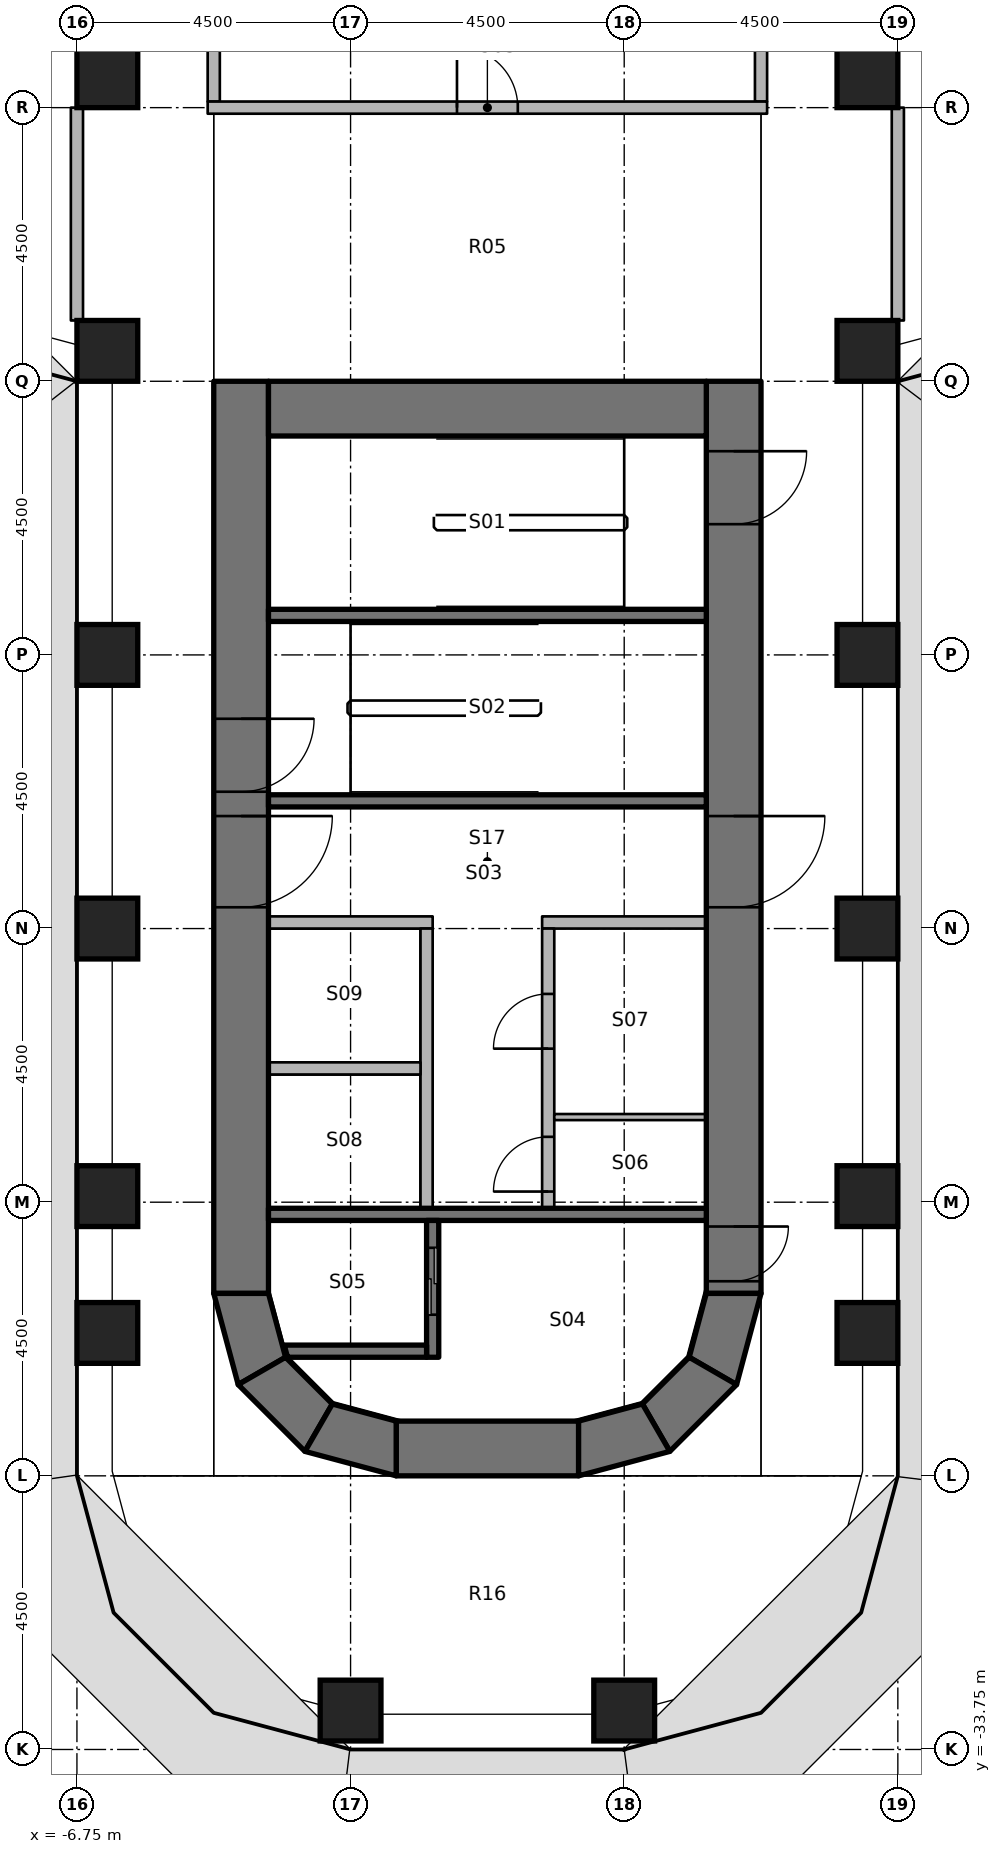
"""IFC4 building model, lengths in metres.
Left out: names, types, materials, properties, quantities, classifications, styles, units other than length and angle.
Written with IfcOpenShell. Run it as: python <this file> out.ifc"""

import sys

from ifc_helpers import new_model, si_unit, direction, frame, frame_2d, origin, origin_2d, place, context, subcontext, project, spatial, polyline, rectangle, outline, extrude, element, fill, save


model = new_model("IFC4")
c1 = context("Model", 3, precision=1e-05, world=origin(), true_north=direction((0.0, 1.0)))
c2 = subcontext(c1, "Body", "Model", "MODEL_VIEW")
j1 = project(units=[si_unit("LENGTHUNIT", "METRE"), si_unit("PLANEANGLEUNIT", "RADIAN")], contexts=[c1])
p1 = place(None, origin())
s1 = spatial("IfcSite", under=j1, at=p1, CompositionType="ELEMENT")
p2 = place(p1, origin())
s2 = spatial("IfcBuilding", under=s1, at=p2, CompositionType="ELEMENT")
p3 = place(p2, frame((0.0, 0.0, 69.0)))
s3 = spatial("IfcBuildingStorey", under=s2, at=p3, CompositionType="ELEMENT", Elevation=69.0)
for number, where, z_axis, x_axis in (
    (1, (-6.25, -26.9, 0.0), (0.0, 0.0, 1.0), (1.0, 0.0, 0.0)),
    (2, (-6.25, -24.65, 0.0), (0.0, 0.0, 1.0), (1.0, 0.0, 0.0)),
    (3, (-6.25, -20.25, 0.0), (0.0, 0.0, 1.0), (1.0, 0.0, 0.0)),
    (4, (-6.25, -15.75, 0.0), (0.0, 0.0, 1.0), (1.0, 0.0, 0.0)),
    (5, (-6.25, -10.75, 0.0), (0.0, 0.0, 1.0), (1.0, 0.0, 0.0)),
    (6, (-6.25, -6.25, 0.0), (0.0, 0.0, 1.0), (1.0, 0.0, 0.0)),
    (7, (-2.25, -33.11, 0.0), (0.0, 0.0, 1.0), (1.0, 0.0, 0.0)),
    (8, (2.25, -33.11, 0.0), (0.0, 0.0, 1.0), (1.0, 0.0, 0.0)),
    (9, (6.25, -26.9, 0.0), (0.0, 0.0, 1.0), (1.0, 0.0, 0.0)),
    (10, (6.25, -24.65, 0.0), (0.0, 0.0, 1.0), (1.0, 0.0, 0.0)),
    (11, (6.25, -20.25, 0.0), (0.0, 0.0, 1.0), (1.0, 0.0, 0.0)),
    (12, (6.25, -15.75, 0.0), (0.0, 0.0, 1.0), (1.0, 0.0, 0.0)),
    (13, (6.25, -10.75, 0.0), (0.0, 0.0, 1.0), (1.0, 0.0, 0.0)),
    (14, (6.25, -6.25, 0.0), (0.0, 0.0, 1.0), (1.0, 0.0, 0.0)),
):
    element("IfcColumn", number, at=place(p3, frame(where, z_axis=z_axis, x_axis=x_axis)), inside=s3, PredefinedType="COLUMN", context=c2, shape_type="SweptSolid", body=[
        extrude(rectangle(XDim=1.0, YDim=1.0, at=origin_2d()), origin(), (0.0, 0.0, 1.0), 4.05),
    ])
p4 = place(p3, frame((-4.05, -11.25, 0.0), z_axis=(0.0, 0.0, 1.0), x_axis=(0.0, -1.0, 0.0)))
e15 = element("IfcWall", 15, at=p4, inside=s3, PredefinedType="SHEAR", context=c2, shape_type="SweptSolid", body=[
    extrude(rectangle(XDim=15.0, YDim=0.9, at=frame_2d((7.5, 0.0))), origin(), (0.0, 0.0, 1.0), 4.2),
])
p5 = place(p4, frame((7.15, 0.0, 0.0)))
e16 = element("IfcOpeningElement", 16, at=p5, cuts=e15, PredefinedType="OPENING", context=c2, shape_type="SweptSolid", body=[
    extrude(rectangle(XDim=1.5, YDim=2.3, at=frame_2d((0.75, 1.15))), frame((0.0, 0.46, 0.0), z_axis=(0.0, -1.0, 0.0), x_axis=(1.0, 0.0, 0.0)), (0.0, 0.0, 1.0), 0.92),
])
p6 = place(p4, frame((5.55, 0.0, 0.0)))
e17 = element("IfcOpeningElement", 17, at=p6, cuts=e15, PredefinedType="OPENING", context=c2, shape_type="SweptSolid", body=[
    extrude(rectangle(XDim=1.2, YDim=2.1, at=frame_2d((0.6, 1.05))), frame((0.0, 0.46, 0.0), z_axis=(0.0, -1.0, 0.0), x_axis=(1.0, 0.0, 0.0)), (0.0, 0.0, 1.0), 0.92),
])
p7 = place(p3, frame((4.05, -11.25, 0.0), z_axis=(0.0, 0.0, 1.0), x_axis=(0.0, -1.0, 0.0)))
e18 = element("IfcWall", 18, at=p7, inside=s3, PredefinedType="SHEAR", context=c2, shape_type="SweptSolid", body=[
    extrude(rectangle(XDim=15.0, YDim=0.9, at=frame_2d((7.5, 0.0))), origin(), (0.0, 0.0, 1.0), 4.2),
])
p8 = place(p7, frame((7.15, 0.0, 0.0)))
e19 = element("IfcOpeningElement", 19, at=p8, cuts=e18, PredefinedType="OPENING", context=c2, shape_type="SweptSolid", body=[
    extrude(rectangle(XDim=1.5, YDim=2.3, at=frame_2d((0.75, 1.15))), frame((0.0, 0.46, 0.0), z_axis=(0.0, -1.0, 0.0), x_axis=(1.0, 0.0, 0.0)), (0.0, 0.0, 1.0), 0.92),
])
p9 = place(p7, frame((13.9, 0.0, 0.0)))
e20 = element("IfcOpeningElement", 20, at=p9, cuts=e18, PredefinedType="OPENING", context=c2, shape_type="SweptSolid", body=[
    extrude(rectangle(XDim=0.9, YDim=2.1, at=frame_2d((0.45, 1.05))), frame((0.0, 0.46, 0.0), z_axis=(0.0, -1.0, 0.0), x_axis=(1.0, 0.0, 0.0)), (0.0, 0.0, 1.0), 0.92),
])
p10 = place(p7, frame((1.15, 0.0, 0.0)))
e21 = element("IfcOpeningElement", 21, at=p10, cuts=e18, PredefinedType="OPENING", context=c2, shape_type="SweptSolid", body=[
    extrude(rectangle(XDim=1.2, YDim=2.1, at=frame_2d((0.6, 1.05))), frame((0.0, 0.46, 0.0), z_axis=(0.0, -1.0, 0.0), x_axis=(1.0, 0.0, 0.0)), (0.0, 0.0, 1.0), 0.92),
])
p11 = place(p3, frame((-3.6, -11.7, 0.0), z_axis=(0.0, 0.0, 1.0), x_axis=(1.0, 0.0, 0.0)))
e22 = element("IfcWall", 22, at=p11, inside=s3, PredefinedType="SHEAR", context=c2, shape_type="SweptSolid", body=[
    extrude(rectangle(XDim=7.2, YDim=0.9, at=frame_2d((3.6, 0.0))), origin(), (0.0, 0.0, 1.0), 4.2),
])
p12 = place(p3, frame((-1.5, -28.8, 0.0), z_axis=(0.0, 0.0, 1.0), x_axis=(1.0, 0.0, 0.0)))
e23 = element("IfcWall", 23, at=p12, inside=s3, PredefinedType="SHEAR", context=c2, shape_type="SweptSolid", body=[
    extrude(rectangle(XDim=3.0, YDim=0.9, at=frame_2d((1.5, 0.0))), origin(), (0.0, 0.0, 1.0), 4.2),
])
p13 = place(p3, origin())
e24 = element("IfcWall", 24, at=p13, inside=s3, PredefinedType="SHEAR", context=c2, shape_type="SweptSolid", body=[
    extrude(outline(polyline([(-4.5, -26.25), (-4.098, -27.75), (-3.319, -27.3), (-3.6, -26.25), (-4.5, -26.25)])), origin(), (0.0, 0.0, 1.0), 4.2),
])
p14 = place(p3, origin())
e25 = element("IfcWall", 25, at=p14, inside=s3, PredefinedType="SHEAR", context=c2, shape_type="SweptSolid", body=[
    extrude(outline(polyline([(-4.098, -27.75), (-3.0, -28.848), (-2.55, -28.069), (-3.319, -27.3), (-4.098, -27.75)])), origin(), (0.0, 0.0, 1.0), 4.2),
])
p15 = place(p3, origin())
e26 = element("IfcWall", 26, at=p15, inside=s3, PredefinedType="SHEAR", context=c2, shape_type="SweptSolid", body=[
    extrude(outline(polyline([(-3.0, -28.848), (-1.5, -29.25), (-1.5, -28.35), (-2.55, -28.069), (-3.0, -28.848)])), origin(), (0.0, 0.0, 1.0), 4.2),
])
p16 = place(p3, origin())
e27 = element("IfcWall", 27, at=p16, inside=s3, PredefinedType="SHEAR", context=c2, shape_type="SweptSolid", body=[
    extrude(outline(polyline([(4.5, -26.25), (4.098, -27.75), (3.319, -27.3), (3.6, -26.25), (4.5, -26.25)])), origin(), (0.0, 0.0, 1.0), 4.2),
])
p17 = place(p3, origin())
e28 = element("IfcWall", 28, at=p17, inside=s3, PredefinedType="SHEAR", context=c2, shape_type="SweptSolid", body=[
    extrude(outline(polyline([(4.098, -27.75), (3.0, -28.848), (2.55, -28.069), (3.319, -27.3), (4.098, -27.75)])), origin(), (0.0, 0.0, 1.0), 4.2),
])
p18 = place(p3, origin())
e29 = element("IfcWall", 29, at=p18, inside=s3, PredefinedType="SHEAR", context=c2, shape_type="SweptSolid", body=[
    extrude(outline(polyline([(3.0, -28.848), (1.5, -29.25), (1.5, -28.35), (2.55, -28.069), (3.0, -28.848)])), origin(), (0.0, 0.0, 1.0), 4.2),
])
p19 = place(p3, frame((3.6, -24.95, 0.0), z_axis=(0.0, 0.0, 1.0), x_axis=(-1.0, 0.0, 0.0)))
e30 = element("IfcWall", 30, at=p19, inside=s3, PredefinedType="SHEAR", context=c2, shape_type="SweptSolid", body=[
    extrude(rectangle(XDim=7.2, YDim=0.2, at=frame_2d((3.6, 0.0))), origin(), (0.0, 0.0, 1.0), 4.05),
])
p20 = place(p3, frame((-0.9, -27.3, 0.0), z_axis=(0.0, 0.0, 1.0), x_axis=(0.0, 1.0, 0.0)))
e31 = element("IfcWall", 31, at=p20, inside=s3, PredefinedType="SHEAR", context=c2, shape_type="SweptSolid", body=[
    extrude(rectangle(XDim=2.25, YDim=0.2, at=frame_2d((1.125, 0.0))), origin(), (0.0, 0.0, 1.0), 4.05),
])
p21 = place(p20, frame((0.7, 0.0, 0.0)))
e32 = element("IfcOpeningElement", 32, at=p21, cuts=e31, PredefinedType="OPENING", context=c2, shape_type="SweptSolid", body=[
    extrude(rectangle(XDim=1.1, YDim=2.3, at=frame_2d((0.55, 1.15))), frame((0.0, 0.11, 0.0), z_axis=(0.0, -1.0, 0.0), x_axis=(1.0, 0.0, 0.0)), (0.0, 0.0, 1.0), 0.22),
])
p22 = place(p3, origin())
e33 = element("IfcWall", 33, at=p22, inside=s3, PredefinedType="SHEAR", context=c2, shape_type="SweptSolid", body=[
    extrude(outline(polyline([(-1.0, -27.1), (-3.341, -27.1), (-3.291, -27.284), (-3.275, -27.3), (-1.0, -27.3), (-1.0, -27.1)])), origin(), (0.0, 0.0, 1.0), 4.05),
])
for number, where, z_axis, x_axis in (
    (34, (3.6, -18.15, 0.0), (0.0, 0.0, 1.0), (-1.0, 0.0, 0.0)),
    (35, (3.6, -15.1, 0.0), (0.0, 0.0, 1.0), (-1.0, 0.0, 0.0)),
):
    element("IfcWall", number, at=place(p3, frame(where, z_axis=z_axis, x_axis=x_axis)), inside=s3, PredefinedType="SHEAR", context=c2, shape_type="SweptSolid", body=[
        extrude(rectangle(XDim=7.2, YDim=0.2, at=frame_2d((3.6, 0.0))), origin(), (0.0, 0.0, 1.0), 4.05),
    ])
p23 = place(p3, frame((3.6, -20.15, 0.0), z_axis=(0.0, 0.0, 1.0), x_axis=(-1.0, 0.0, 0.0)))
e36 = element("IfcWall", 36, at=p23, inside=s3, PredefinedType="PARTITIONING", context=c2, shape_type="SweptSolid", body=[
    extrude(rectangle(XDim=2.7, YDim=0.2, at=frame_2d((1.35, 0.0))), origin(), (0.0, 0.0, 1.0), 4.05),
])
p24 = place(p3, frame((1.0, -24.85, 0.0), z_axis=(0.0, 0.0, 1.0), x_axis=(0.0, 1.0, 0.0)))
e37 = element("IfcWall", 37, at=p24, inside=s3, PredefinedType="PARTITIONING", context=c2, shape_type="SweptSolid", body=[
    extrude(rectangle(XDim=4.6, YDim=0.2, at=frame_2d((2.3, 0.0))), origin(), (0.0, 0.0, 1.0), 4.05),
])
p25 = place(p24, frame((0.275, 0.0, 0.0)))
e38 = element("IfcOpeningElement", 38, at=p25, cuts=e37, PredefinedType="OPENING", context=c2, shape_type="SweptSolid", body=[
    extrude(rectangle(XDim=0.9, YDim=2.1, at=frame_2d((0.45, 1.05))), frame((0.0, 0.11, 0.0), z_axis=(0.0, -1.0, 0.0), x_axis=(1.0, 0.0, 0.0)), (0.0, 0.0, 1.0), 0.22),
])
p26 = place(p24, frame((2.625, 0.0, 0.0)))
e39 = element("IfcOpeningElement", 39, at=p26, cuts=e37, PredefinedType="OPENING", context=c2, shape_type="SweptSolid", body=[
    extrude(rectangle(XDim=0.9, YDim=2.1, at=frame_2d((0.45, 1.05))), frame((0.0, 0.11, 0.0), z_axis=(0.0, -1.0, 0.0), x_axis=(1.0, 0.0, 0.0)), (0.0, 0.0, 1.0), 0.22),
])
p27 = place(p3, frame((-0.9, -20.15, 0.0), z_axis=(0.0, 0.0, 1.0), x_axis=(-1.0, 0.0, 0.0)))
e40 = element("IfcWall", 40, at=p27, inside=s3, PredefinedType="PARTITIONING", context=c2, shape_type="SweptSolid", body=[
    extrude(rectangle(XDim=2.7, YDim=0.2, at=frame_2d((1.35, 0.0))), origin(), (0.0, 0.0, 1.0), 4.05),
])
p28 = place(p3, frame((-1.0, -24.85, 0.0), z_axis=(0.0, 0.0, 1.0), x_axis=(0.0, 1.0, 0.0)))
e41 = element("IfcWall", 41, at=p28, inside=s3, PredefinedType="PARTITIONING", context=c2, shape_type="SweptSolid", body=[
    extrude(rectangle(XDim=4.6, YDim=0.2, at=frame_2d((2.3, 0.0))), origin(), (0.0, 0.0, 1.0), 4.05),
])
p29 = place(p3, frame((3.6, -23.35, 0.0), z_axis=(0.0, 0.0, 1.0), x_axis=(-1.0, 0.0, 0.0)))
e42 = element("IfcWall", 42, at=p29, inside=s3, PredefinedType="PARTITIONING", context=c2, shape_type="SweptSolid", body=[
    extrude(rectangle(XDim=2.5, YDim=0.1, at=frame_2d((1.25, 0.0))), origin(), (0.0, 0.0, 1.0), 4.05),
])
p30 = place(p3, frame((-1.1, -22.55, 0.0), z_axis=(0.0, 0.0, 1.0), x_axis=(-1.0, 0.0, 0.0)))
e43 = element("IfcWall", 43, at=p30, inside=s3, PredefinedType="PARTITIONING", context=c2, shape_type="SweptSolid", body=[
    extrude(rectangle(XDim=2.5, YDim=0.2, at=frame_2d((1.25, 0.0))), origin(), (0.0, 0.0, 1.0), 4.05),
])
p31 = place(p3, frame((-4.5, -6.65, 0.0), z_axis=(0.0, 0.0, 1.0), x_axis=(0.0, 1.0, 0.0)))
e44 = element("IfcWall", 44, at=p31, inside=s3, PredefinedType="PARTITIONING", context=c2, shape_type="SweptSolid", body=[
    extrude(rectangle(XDim=4.3, YDim=0.2, at=frame_2d((2.15, 0.0))), origin(), (0.0, 0.0, 1.0), 3.131),
])
p32 = place(p3, frame((-6.75, -10.25, 0.0), z_axis=(0.0, 0.0, 1.0), x_axis=(0.0, 1.0, 0.0)))
e45 = element("IfcWall", 45, at=p32, inside=s3, PredefinedType="PARTITIONING", context=c2, shape_type="SweptSolid", body=[
    extrude(rectangle(XDim=3.5, YDim=0.2, at=frame_2d((1.75, 0.0))), origin(), (0.0, 0.0, 1.0), 3.131),
])
p33 = place(p3, frame((4.5, -6.65, 0.0), z_axis=(0.0, 0.0, 1.0), x_axis=(0.0, 1.0, 0.0)))
e46 = element("IfcWall", 46, at=p33, inside=s3, PredefinedType="PARTITIONING", context=c2, shape_type="SweptSolid", body=[
    extrude(rectangle(XDim=4.3, YDim=0.2, at=frame_2d((2.15, 0.0))), origin(), (0.0, 0.0, 1.0), 3.131),
])
p34 = place(p3, frame((6.75, -10.25, 0.0), z_axis=(0.0, 0.0, 1.0), x_axis=(0.0, 1.0, 0.0)))
e47 = element("IfcWall", 47, at=p34, inside=s3, PredefinedType="PARTITIONING", context=c2, shape_type="SweptSolid", body=[
    extrude(rectangle(XDim=3.5, YDim=0.2, at=frame_2d((1.75, 0.0))), origin(), (0.0, 0.0, 1.0), 3.131),
])
p35 = place(p3, frame((-4.6, -6.75, 0.0), z_axis=(0.0, 0.0, 1.0), x_axis=(1.0, 0.0, 0.0)))
e48 = element("IfcWall", 48, at=p35, inside=s3, PredefinedType="PARTITIONING", context=c2, shape_type="SweptSolid", body=[
    extrude(rectangle(XDim=9.2, YDim=0.2, at=frame_2d((4.6, 0.0))), origin(), (0.0, 0.0, 1.0), 3.131),
])
p36 = place(p35, frame((4.1, 0.0, 0.0)))
e49 = element("IfcOpeningElement", 49, at=p36, cuts=e48, PredefinedType="OPENING", context=c2, shape_type="SweptSolid", body=[
    extrude(rectangle(XDim=1.0, YDim=2.1, at=frame_2d((0.5, 1.05))), frame((0.0, 0.11, 0.0), z_axis=(0.0, -1.0, 0.0), x_axis=(1.0, 0.0, 0.0)), (0.0, 0.0, 1.0), 0.22),
])
p37 = place(p8, origin())
e50 = element("IfcDoor", 50, at=p37, inside=s3, OperationType="DOUBLE_DOOR_SINGLE_SWING", PredefinedType="DOOR", context=c2, shape_type="SweptSolid", body=[
    extrude(rectangle(XDim=1.5, YDim=2.3, at=frame_2d((0.75, 1.15))), frame((0.0, 0.025, 0.0), z_axis=(0.0, -1.0, 0.0), x_axis=(1.0, 0.0, 0.0)), (0.0, 0.0, 1.0), 0.05),
])
fill(e19, e50)
p38 = place(p5, origin())
e51 = element("IfcDoor", 51, at=p38, inside=s3, OperationType="DOUBLE_DOOR_SINGLE_SWING", PredefinedType="DOOR", context=c2, shape_type="SweptSolid", body=[
    extrude(rectangle(XDim=1.5, YDim=2.3, at=frame_2d((0.75, 1.15))), frame((0.0, 0.025, 0.0), z_axis=(0.0, -1.0, 0.0), x_axis=(1.0, 0.0, 0.0)), (0.0, 0.0, 1.0), 0.05),
])
fill(e16, e51)
p39 = place(p9, origin())
e52 = element("IfcDoor", 52, at=p39, inside=s3, OperationType="SINGLE_SWING_LEFT", PredefinedType="DOOR", context=c2, shape_type="SweptSolid", body=[
    extrude(rectangle(XDim=0.9, YDim=2.1, at=frame_2d((0.45, 1.05))), frame((0.0, 0.025, 0.0), z_axis=(0.0, -1.0, 0.0), x_axis=(1.0, 0.0, 0.0)), (0.0, 0.0, 1.0), 0.05),
])
fill(e20, e52)
p40 = place(p6, origin())
e53 = element("IfcDoor", 53, at=p40, inside=s3, OperationType="SINGLE_SWING_RIGHT", PredefinedType="DOOR", context=c2, shape_type="SweptSolid", body=[
    extrude(rectangle(XDim=1.2, YDim=2.1, at=frame_2d((0.6, 1.05))), frame((0.0, 0.025, 0.0), z_axis=(0.0, -1.0, 0.0), x_axis=(1.0, 0.0, 0.0)), (0.0, 0.0, 1.0), 0.05),
])
fill(e17, e53)
p41 = place(p10, origin())
e54 = element("IfcDoor", 54, at=p41, inside=s3, OperationType="SINGLE_SWING_LEFT", PredefinedType="DOOR", context=c2, shape_type="SweptSolid", body=[
    extrude(rectangle(XDim=1.2, YDim=2.1, at=frame_2d((0.6, 1.05))), frame((0.0, 0.025, 0.0), z_axis=(0.0, -1.0, 0.0), x_axis=(1.0, 0.0, 0.0)), (0.0, 0.0, 1.0), 0.05),
])
fill(e21, e54)
p42 = place(p21, origin())
e55 = element("IfcDoor", 55, at=p42, inside=s3, OperationType="DOUBLE_DOOR_SLIDING", PredefinedType="DOOR", context=c2, shape_type="SweptSolid", body=[
    extrude(rectangle(XDim=1.1, YDim=2.3, at=frame_2d((0.55, 1.15))), frame((0.0, 0.025, 0.0), z_axis=(0.0, -1.0, 0.0), x_axis=(1.0, 0.0, 0.0)), (0.0, 0.0, 1.0), 0.05),
])
fill(e32, e55)
p43 = place(p25, origin())
e56 = element("IfcDoor", 56, at=p43, inside=s3, OperationType="SINGLE_SWING_LEFT", PredefinedType="DOOR", context=c2, shape_type="SweptSolid", body=[
    extrude(rectangle(XDim=0.9, YDim=2.1, at=frame_2d((0.45, 1.05))), frame((0.0, 0.025, 0.0), z_axis=(0.0, -1.0, 0.0), x_axis=(1.0, 0.0, 0.0)), (0.0, 0.0, 1.0), 0.05),
])
fill(e38, e56)
p44 = place(p26, origin())
e57 = element("IfcDoor", 57, at=p44, inside=s3, OperationType="SINGLE_SWING_LEFT", PredefinedType="DOOR", context=c2, shape_type="SweptSolid", body=[
    extrude(rectangle(XDim=0.9, YDim=2.1, at=frame_2d((0.45, 1.05))), frame((0.0, 0.025, 0.0), z_axis=(0.0, -1.0, 0.0), x_axis=(1.0, 0.0, 0.0)), (0.0, 0.0, 1.0), 0.05),
])
fill(e39, e57)
p45 = place(p36, origin())
e58 = element("IfcDoor", 58, at=p45, inside=s3, OperationType="SINGLE_SWING_RIGHT", PredefinedType="DOOR", context=c2, shape_type="SweptSolid", body=[
    extrude(rectangle(XDim=1.0, YDim=2.1, at=frame_2d((0.5, 1.05))), frame((0.0, 0.025, 0.0), z_axis=(0.0, -1.0, 0.0), x_axis=(1.0, 0.0, 0.0)), (0.0, 0.0, 1.0), 0.05),
])
fill(e49, e58)
save(model, sys.argv[1])
